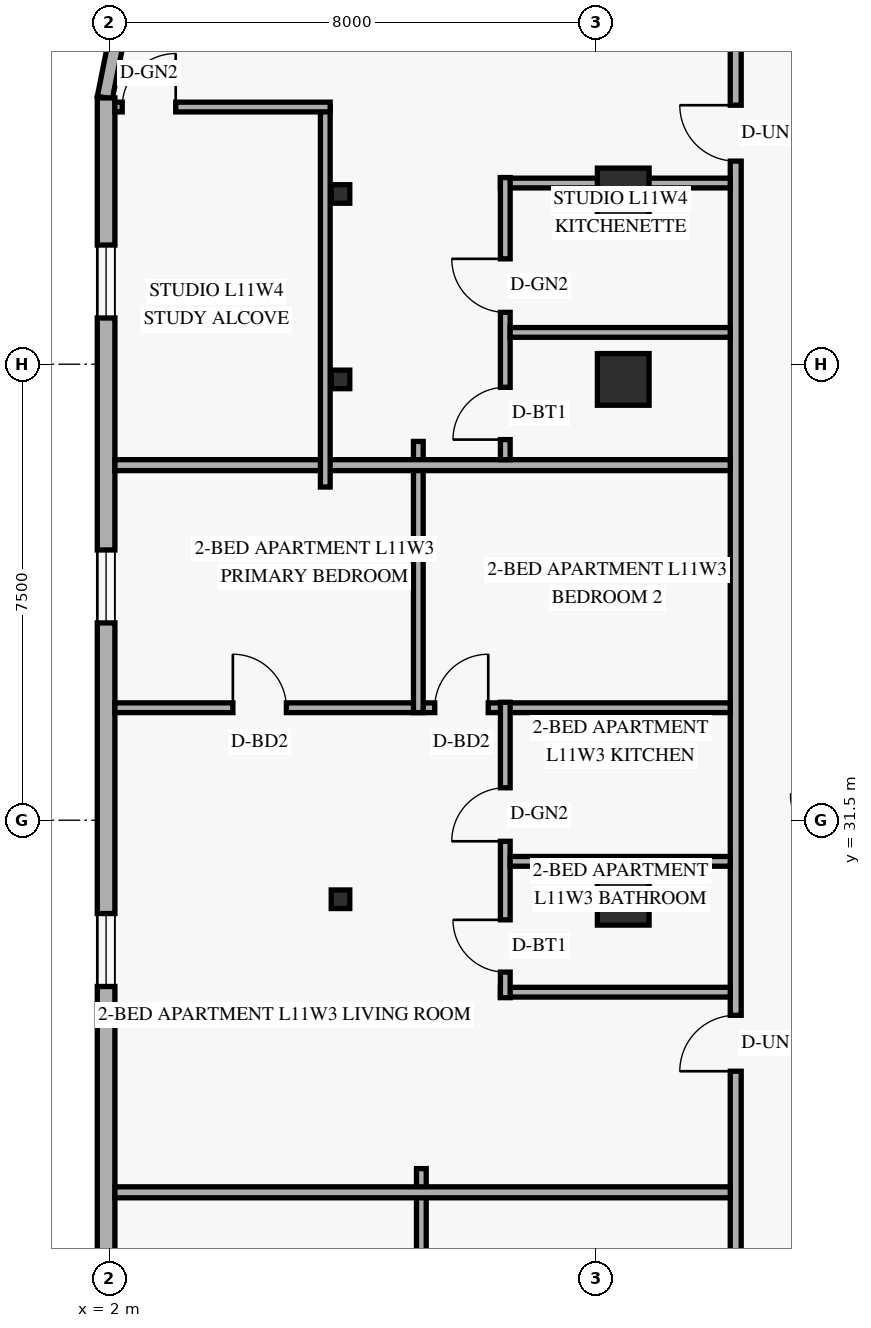
"""IFC4 building model, lengths in metres.
Left out: names, types, materials, properties, quantities, classifications, styles, units other than length and angle.
Written with IfcOpenShell. Run it as: python <this file> out.ifc"""

import sys

from ifc_helpers import new_model, si_unit, direction, frame, frame_2d, origin, origin_2d, place, context, subcontext, project, spatial, rectangle, hollow_rectangle, extrude, element, fill, save


model = new_model("IFC4")
c1 = context("Model", 3, precision=1e-05, world=origin(), true_north=direction((0.0, 1.0)))
c2 = subcontext(c1, "Body", "Model", "MODEL_VIEW")
j1 = project(units=[si_unit("LENGTHUNIT", "METRE"), si_unit("PLANEANGLEUNIT", "RADIAN")], contexts=[c1])
p1 = place(None, origin())
s1 = spatial("IfcSite", under=j1, at=p1, CompositionType="ELEMENT")
p2 = place(p1, origin())
s2 = spatial("IfcBuilding", under=s1, at=p2, CompositionType="ELEMENT")
p3 = place(p2, frame((0.0, 0.0, 45.6)))
s3 = spatial("IfcBuildingStorey", under=s2, at=p3, CompositionType="ELEMENT", Elevation=45.6)
for number, where, z_axis, x_axis in (
    (1, (5.8, 30.2, 0.0), (0.0, 0.0, 1.0), (1.0, 0.0, 0.0)),
    (2, (5.8, 38.75, 0.0), (0.0, 0.0, 1.0), (1.0, 0.0, 0.0)),
    (3, (5.8, 41.8, 0.0), (0.0, 0.0, 1.0), (1.0, 0.0, 0.0)),
):
    element("IfcColumn", number, at=place(p3, frame(where, z_axis=z_axis, x_axis=x_axis)), inside=s3, PredefinedType="COLUMN", context=c2, shape_type="SweptSolid", body=[
        extrude(hollow_rectangle(XDim=0.305, YDim=0.305, WallThickness=0.013, at=origin_2d()), origin(), (0.0, 0.0, 1.0), 3.6),
    ])
for number, where, z_axis, x_axis in (
    (4, (10.45, 30.2, 0.0), (0.0, 0.0, 1.0), (1.0, 0.0, 0.0)),
    (5, (10.45, 38.75, 0.0), (0.0, 0.0, 1.0), (1.0, 0.0, 0.0)),
    (6, (10.45, 41.8, 0.0), (0.0, 0.0, 1.0), (1.0, 0.0, 0.0)),
):
    element("IfcColumn", number, at=place(p3, frame(where, z_axis=z_axis, x_axis=x_axis)), inside=s3, PredefinedType="COLUMN", context=c2, shape_type="SweptSolid", body=[
        extrude(rectangle(XDim=0.85, YDim=0.85, at=origin_2d()), origin(), (0.0, 0.0, 1.0), 3.6),
    ])
p4 = place(p3, frame((2.195, 44.746, 0.0), z_axis=(0.0, 0.0, 1.0), x_axis=(-0.19496651342, -0.980809899341, 0.0)))
e7 = element("IfcWall", 7, at=p4, inside=s3, PredefinedType="SOLIDWALL", context=c2, shape_type="SweptSolid", body=[
    extrude(rectangle(XDim=1.389, YDim=0.25, at=frame_2d((0.694, 0.0))), origin(), (0.0, 0.0, 1.0), 3.36),
])
p5 = place(p3, frame((1.945, 43.38, 0.0), z_axis=(0.0, 0.0, 1.0), x_axis=(0.0, -1.0, 0.0)))
e8 = element("IfcWall", 8, at=p5, inside=s3, PredefinedType="SOLIDWALL", context=c2, shape_type="SweptSolid", body=[
    extrude(rectangle(XDim=38.76, YDim=0.29, at=frame_2d((19.38, 0.0))), origin(), (0.0, 0.0, 1.0), 3.36),
])
p6 = place(p5, frame((34.22, 0.0, 0.85)))
e9 = element("IfcOpeningElement", 9, at=p6, cuts=e8, PredefinedType="OPENING", context=c2, shape_type="SweptSolid", body=[
    extrude(rectangle(XDim=1.2, YDim=1.5, at=frame_2d((0.6, 0.75))), frame((0.0, 0.155, 0.0), z_axis=(0.0, -1.0, 0.0), x_axis=(1.0, 0.0, 0.0)), (0.0, 0.0, 1.0), 0.31),
])
p7 = place(p5, frame((29.035, 0.0, 0.85)))
e10 = element("IfcOpeningElement", 10, at=p7, cuts=e8, PredefinedType="OPENING", context=c2, shape_type="SweptSolid", body=[
    extrude(rectangle(XDim=1.2, YDim=1.5, at=frame_2d((0.6, 0.75))), frame((0.0, 0.155, 0.0), z_axis=(0.0, -1.0, 0.0), x_axis=(1.0, 0.0, 0.0)), (0.0, 0.0, 1.0), 0.31),
])
p8 = place(p5, frame((24.415, 0.0, 0.85)))
e11 = element("IfcOpeningElement", 11, at=p8, cuts=e8, PredefinedType="OPENING", context=c2, shape_type="SweptSolid", body=[
    extrude(rectangle(XDim=1.2, YDim=1.5, at=frame_2d((0.6, 0.75))), frame((0.0, 0.155, 0.0), z_axis=(0.0, -1.0, 0.0), x_axis=(1.0, 0.0, 0.0)), (0.0, 0.0, 1.0), 0.31),
])
p9 = place(p5, frame((19.22, 0.0, 0.85)))
e12 = element("IfcOpeningElement", 12, at=p9, cuts=e8, PredefinedType="OPENING", context=c2, shape_type="SweptSolid", body=[
    extrude(rectangle(XDim=1.2, YDim=1.5, at=frame_2d((0.6, 0.75))), frame((0.0, 0.155, 0.0), z_axis=(0.0, -1.0, 0.0), x_axis=(1.0, 0.0, 0.0)), (0.0, 0.0, 1.0), 0.31),
])
p10 = place(p5, frame((13.415, 0.0, 0.85)))
e13 = element("IfcOpeningElement", 13, at=p10, cuts=e8, PredefinedType="OPENING", context=c2, shape_type="SweptSolid", body=[
    extrude(rectangle(XDim=1.2, YDim=1.5, at=frame_2d((0.6, 0.75))), frame((0.0, 0.155, 0.0), z_axis=(0.0, -1.0, 0.0), x_axis=(1.0, 0.0, 0.0)), (0.0, 0.0, 1.0), 0.31),
])
p11 = place(p5, frame((7.435, 0.0, 0.85)))
e14 = element("IfcOpeningElement", 14, at=p11, cuts=e8, PredefinedType="OPENING", context=c2, shape_type="SweptSolid", body=[
    extrude(rectangle(XDim=1.2, YDim=1.5, at=frame_2d((0.6, 0.75))), frame((0.0, 0.155, 0.0), z_axis=(0.0, -1.0, 0.0), x_axis=(1.0, 0.0, 0.0)), (0.0, 0.0, 1.0), 0.31),
])
p12 = place(p5, frame((2.42, 0.0, 0.85)))
e15 = element("IfcOpeningElement", 15, at=p12, cuts=e8, PredefinedType="OPENING", context=c2, shape_type="SweptSolid", body=[
    extrude(rectangle(XDim=1.2, YDim=1.5, at=frame_2d((0.6, 0.75))), frame((0.0, 0.155, 0.0), z_axis=(0.0, -1.0, 0.0), x_axis=(1.0, 0.0, 0.0)), (0.0, 0.0, 1.0), 0.31),
])
p13 = place(p3, frame((12.3, 1.29, 0.0), z_axis=(0.0, 0.0, 1.0), x_axis=(0.0, 1.0, 0.0)))
e16 = element("IfcWall", 16, at=p13, inside=s3, PredefinedType="STANDARD", context=c2, shape_type="SweptSolid", body=[
    extrude(rectangle(XDim=45.42, YDim=0.18, at=frame_2d((22.71, 0.0))), origin(), (0.0, 0.0, 1.0), 2.649),
])
p14 = place(p13, frame((5.27, 0.0, 0.0)))
e17 = element("IfcOpeningElement", 17, at=p14, cuts=e16, PredefinedType="OPENING", context=c2, shape_type="SweptSolid", body=[
    extrude(rectangle(XDim=0.92, YDim=2.15, at=frame_2d((0.46, 1.075))), frame((0.0, 0.1, 0.0), z_axis=(0.0, -1.0, 0.0), x_axis=(1.0, 0.0, 0.0)), (0.0, 0.0, 1.0), 0.2),
])
p15 = place(p13, frame((14.5, 0.0, 0.0)))
e18 = element("IfcOpeningElement", 18, at=p15, cuts=e16, PredefinedType="OPENING", context=c2, shape_type="SweptSolid", body=[
    extrude(rectangle(XDim=0.92, YDim=2.15, at=frame_2d((0.46, 1.075))), frame((0.0, 0.1, 0.0), z_axis=(0.0, -1.0, 0.0), x_axis=(1.0, 0.0, 0.0)), (0.0, 0.0, 1.0), 0.2),
])
p16 = place(p13, frame((26.082, 0.0, 0.0)))
e19 = element("IfcOpeningElement", 19, at=p16, cuts=e16, PredefinedType="OPENING", context=c2, shape_type="SweptSolid", body=[
    extrude(rectangle(XDim=0.92, YDim=2.15, at=frame_2d((0.46, 1.075))), frame((0.0, 0.1, 0.0), z_axis=(0.0, -1.0, 0.0), x_axis=(1.0, 0.0, 0.0)), (0.0, 0.0, 1.0), 0.2),
])
p17 = place(p13, frame((41.05, 0.0, 0.0)))
e20 = element("IfcOpeningElement", 20, at=p17, cuts=e16, PredefinedType="OPENING", context=c2, shape_type="SweptSolid", body=[
    extrude(rectangle(XDim=0.92, YDim=2.15, at=frame_2d((0.46, 1.075))), frame((0.0, 0.1, 0.0), z_axis=(0.0, -1.0, 0.0), x_axis=(1.0, 0.0, 0.0)), (0.0, 0.0, 1.0), 0.2),
])
p18 = place(p3, frame((7.13, 21.66, 0.0), z_axis=(0.0, 0.0, 1.0), x_axis=(0.0, 1.0, 0.0)))
e21 = element("IfcWall", 21, at=p18, inside=s3, PredefinedType="PARTITIONING", context=c2, shape_type="SweptSolid", body=[
    extrude(rectangle(XDim=4.11, YDim=0.16, at=frame_2d((2.055, 0.0))), origin(), (0.0, 0.0, 1.0), 3.36),
])
p19 = place(p3, frame((2.09, 25.38, 0.0), z_axis=(0.0, 0.0, 1.0), x_axis=(1.0, 0.0, 0.0)))
e22 = element("IfcWall", 22, at=p19, inside=s3, PredefinedType="PARTITIONING", context=c2, shape_type="SweptSolid", body=[
    extrude(rectangle(XDim=10.12, YDim=0.18, at=frame_2d((5.06, 0.0))), origin(), (0.0, 0.0, 1.0), 2.649),
])
p20 = place(p3, frame((2.09, 33.35, 0.0), z_axis=(0.0, 0.0, 1.0), x_axis=(1.0, 0.0, 0.0)))
e23 = element("IfcWall", 23, at=p20, inside=s3, PredefinedType="PARTITIONING", context=c2, shape_type="SweptSolid", body=[
    extrude(rectangle(XDim=10.12, YDim=0.16, at=frame_2d((5.06, 0.0))), origin(), (0.0, 0.0, 1.0), 2.649),
])
p21 = place(p20, frame((1.94, 0.0, 0.0)))
e24 = element("IfcOpeningElement", 24, at=p21, cuts=e23, PredefinedType="OPENING", context=c2, shape_type="SweptSolid", body=[
    extrude(rectangle(XDim=0.88, YDim=2.14, at=frame_2d((0.44, 1.07))), frame((0.0, 0.09, 0.0), z_axis=(0.0, -1.0, 0.0), x_axis=(1.0, 0.0, 0.0)), (0.0, 0.0, 1.0), 0.18),
])
p22 = place(p20, frame((5.26, 0.0, 0.0)))
e25 = element("IfcOpeningElement", 25, at=p22, cuts=e23, PredefinedType="OPENING", context=c2, shape_type="SweptSolid", body=[
    extrude(rectangle(XDim=0.88, YDim=2.14, at=frame_2d((0.44, 1.07))), frame((0.0, 0.09, 0.0), z_axis=(0.0, -1.0, 0.0), x_axis=(1.0, 0.0, 0.0)), (0.0, 0.0, 1.0), 0.18),
])
p23 = place(p3, frame((8.43, 28.671, 0.0), z_axis=(0.0, 0.0, 1.0), x_axis=(1.0, 0.0, 0.0)))
e26 = element("IfcWall", 26, at=p23, inside=s3, PredefinedType="PLUMBINGWALL", context=c2, shape_type="SweptSolid", body=[
    extrude(rectangle(XDim=3.78, YDim=0.16, at=frame_2d((1.89, 0.0))), origin(), (0.0, 0.0, 1.0), 2.649),
])
p24 = place(p3, frame((8.51, 28.582, 0.0), z_axis=(0.0, 0.0, 1.0), x_axis=(0.0, 1.0, 0.0)))
e27 = element("IfcWall", 27, at=p24, inside=s3, PredefinedType="PLUMBINGWALL", context=c2, shape_type="SweptSolid", body=[
    extrude(rectangle(XDim=4.858, YDim=0.16, at=frame_2d((2.429, 0.0))), origin(), (0.0, 0.0, 1.0), 2.649),
])
p25 = place(p24, frame((0.42, 0.0, 0.0)))
e28 = element("IfcOpeningElement", 28, at=p25, cuts=e27, PredefinedType="OPENING", context=c2, shape_type="SweptSolid", body=[
    extrude(rectangle(XDim=0.86, YDim=2.12, at=frame_2d((0.43, 1.06))), frame((0.0, 0.09, 0.0), z_axis=(0.0, -1.0, 0.0), x_axis=(1.0, 0.0, 0.0)), (0.0, 0.0, 1.0), 0.18),
])
p26 = place(p24, frame((2.572, 0.0, 0.0)))
e29 = element("IfcOpeningElement", 29, at=p26, cuts=e27, PredefinedType="OPENING", context=c2, shape_type="SweptSolid", body=[
    extrude(rectangle(XDim=0.88, YDim=2.12, at=frame_2d((0.44, 1.06))), frame((0.0, 0.09, 0.0), z_axis=(0.0, -1.0, 0.0), x_axis=(1.0, 0.0, 0.0)), (0.0, 0.0, 1.0), 0.18),
])
p27 = place(p3, frame((8.59, 30.823, 0.0), z_axis=(0.0, 0.0, 1.0), x_axis=(1.0, 0.0, 0.0)))
e30 = element("IfcWall", 30, at=p27, inside=s3, PredefinedType="PLUMBINGWALL", context=c2, shape_type="SweptSolid", body=[
    extrude(rectangle(XDim=3.62, YDim=0.16, at=frame_2d((1.81, 0.0))), origin(), (0.0, 0.0, 1.0), 2.649),
])
p28 = place(p3, frame((7.08, 33.27, 0.0), z_axis=(0.0, 0.0, 1.0), x_axis=(0.0, 1.0, 0.0)))
e31 = element("IfcWall", 31, at=p28, inside=s3, PredefinedType="PARTITIONING", context=c2, shape_type="SweptSolid", body=[
    extrude(rectangle(XDim=4.46, YDim=0.16, at=frame_2d((2.23, 0.0))), origin(), (0.0, 0.0, 1.0), 2.932),
])
p29 = place(p3, frame((2.09, 37.34, 0.0), z_axis=(0.0, 0.0, 1.0), x_axis=(1.0, 0.0, 0.0)))
e32 = element("IfcWall", 32, at=p29, inside=s3, PredefinedType="PARTITIONING", context=c2, shape_type="SweptSolid", body=[
    extrude(rectangle(XDim=10.12, YDim=0.18, at=frame_2d((5.06, 0.0))), origin(), (0.0, 0.0, 1.0), 2.649),
])
p30 = place(p3, frame((8.43, 41.98, 0.0), z_axis=(0.0, 0.0, 1.0), x_axis=(1.0, 0.0, 0.0)))
e33 = element("IfcWall", 33, at=p30, inside=s3, PredefinedType="PLUMBINGWALL", context=c2, shape_type="SweptSolid", body=[
    extrude(rectangle(XDim=3.78, YDim=0.16, at=frame_2d((1.89, 0.0))), origin(), (0.0, 0.0, 1.0), 2.809),
])
p31 = place(p3, frame((8.51, 37.43, 0.0), z_axis=(0.0, 0.0, 1.0), x_axis=(0.0, 1.0, 0.0)))
e34 = element("IfcWall", 34, at=p31, inside=s3, PredefinedType="PLUMBINGWALL", context=c2, shape_type="SweptSolid", body=[
    extrude(rectangle(XDim=4.64, YDim=0.16, at=frame_2d((2.32, 0.0))), origin(), (0.0, 0.0, 1.0), 2.649),
])
p32 = place(p31, frame((0.33, 0.0, 0.0)))
e35 = element("IfcOpeningElement", 35, at=p32, cuts=e34, PredefinedType="OPENING", context=c2, shape_type="SweptSolid", body=[
    extrude(rectangle(XDim=0.86, YDim=2.12, at=frame_2d((0.43, 1.06))), frame((0.0, 0.09, 0.0), z_axis=(0.0, -1.0, 0.0), x_axis=(1.0, 0.0, 0.0)), (0.0, 0.0, 1.0), 0.18),
])
p33 = place(p31, frame((2.423, 0.0, 0.0)))
e36 = element("IfcOpeningElement", 36, at=p33, cuts=e34, PredefinedType="OPENING", context=c2, shape_type="SweptSolid", body=[
    extrude(rectangle(XDim=0.88, YDim=2.12, at=frame_2d((0.44, 1.06))), frame((0.0, 0.09, 0.0), z_axis=(0.0, -1.0, 0.0), x_axis=(1.0, 0.0, 0.0)), (0.0, 0.0, 1.0), 0.18),
])
p34 = place(p3, frame((8.59, 39.523, 0.0), z_axis=(0.0, 0.0, 1.0), x_axis=(1.0, 0.0, 0.0)))
e37 = element("IfcWall", 37, at=p34, inside=s3, PredefinedType="PLUMBINGWALL", context=c2, shape_type="SweptSolid", body=[
    extrude(rectangle(XDim=3.62, YDim=0.16, at=frame_2d((1.81, 0.0))), origin(), (0.0, 0.0, 1.0), 2.649),
])
p35 = place(p3, frame((5.55, 36.98, 0.0), z_axis=(0.0, 0.0, 1.0), x_axis=(0.0, 1.0, 0.0)))
e38 = element("IfcWall", 38, at=p35, inside=s3, PredefinedType="PARTITIONING", context=c2, shape_type="SweptSolid", body=[
    extrude(rectangle(XDim=6.25, YDim=0.16, at=frame_2d((3.125, 0.0))), origin(), (0.0, 0.0, 1.0), 3.36),
])
p36 = place(p3, frame((2.09, 43.23, 0.0), z_axis=(0.0, 0.0, 1.0), x_axis=(1.0, 0.0, 0.0)))
e39 = element("IfcWall", 39, at=p36, inside=s3, PredefinedType="PARTITIONING", context=c2, shape_type="SweptSolid", body=[
    extrude(rectangle(XDim=3.54, YDim=0.16, at=frame_2d((1.77, 0.0))), origin(), (0.0, 0.0, 1.0), 3.36),
])
p37 = place(p36, frame((0.12, 0.0, 0.0)))
e40 = element("IfcOpeningElement", 40, at=p37, cuts=e39, PredefinedType="OPENING", context=c2, shape_type="SweptSolid", body=[
    extrude(rectangle(XDim=0.88, YDim=2.12, at=frame_2d((0.44, 1.06))), frame((0.0, 0.09, 0.0), z_axis=(0.0, -1.0, 0.0), x_axis=(1.0, 0.0, 0.0)), (0.0, 0.0, 1.0), 0.18),
])
p38 = place(p10, origin())
e41 = element("IfcWindow", 41, at=p38, inside=s3, PartitioningType="SINGLE_PANEL", PredefinedType="WINDOW", context=c2, shape_type="SweptSolid", body=[
    extrude(rectangle(XDim=1.2, YDim=1.5, at=frame_2d((0.6, 0.75))), frame((0.0, 0.03, 0.0), z_axis=(0.0, -1.0, 0.0), x_axis=(1.0, 0.0, 0.0)), (0.0, 0.0, 1.0), 0.06),
])
fill(e13, e41)
p39 = place(p11, origin())
e42 = element("IfcWindow", 42, at=p39, inside=s3, PartitioningType="SINGLE_PANEL", PredefinedType="WINDOW", context=c2, shape_type="SweptSolid", body=[
    extrude(rectangle(XDim=1.2, YDim=1.5, at=frame_2d((0.6, 0.75))), frame((0.0, 0.03, 0.0), z_axis=(0.0, -1.0, 0.0), x_axis=(1.0, 0.0, 0.0)), (0.0, 0.0, 1.0), 0.06),
])
fill(e14, e42)
p40 = place(p12, origin())
e43 = element("IfcWindow", 43, at=p40, inside=s3, PartitioningType="SINGLE_PANEL", PredefinedType="WINDOW", context=c2, shape_type="SweptSolid", body=[
    extrude(rectangle(XDim=1.2, YDim=1.5, at=frame_2d((0.6, 0.75))), frame((0.0, 0.03, 0.0), z_axis=(0.0, -1.0, 0.0), x_axis=(1.0, 0.0, 0.0)), (0.0, 0.0, 1.0), 0.06),
])
fill(e15, e43)
p41 = place(p16, origin())
e44 = element("IfcDoor", 44, at=p41, inside=s3, OperationType="SINGLE_SWING_LEFT", PredefinedType="DOOR", context=c2, shape_type="SweptSolid", body=[
    extrude(rectangle(XDim=0.92, YDim=2.15, at=frame_2d((0.46, 1.075))), frame((0.0, 0.025, 0.0), z_axis=(0.0, -1.0, 0.0), x_axis=(1.0, 0.0, 0.0)), (0.0, 0.0, 1.0), 0.05),
])
fill(e19, e44)
p42 = place(p25, origin())
e45 = element("IfcDoor", 45, at=p42, inside=s3, OperationType="SINGLE_SWING_RIGHT", PredefinedType="DOOR", context=c2, shape_type="SweptSolid", body=[
    extrude(rectangle(XDim=0.86, YDim=2.12, at=frame_2d((0.43, 1.06))), frame((0.0, 0.025, 0.0), z_axis=(0.0, -1.0, 0.0), x_axis=(1.0, 0.0, 0.0)), (0.0, 0.0, 1.0), 0.05),
])
fill(e28, e45)
p43 = place(p26, origin())
e46 = element("IfcDoor", 46, at=p43, inside=s3, OperationType="SINGLE_SWING_LEFT", PredefinedType="DOOR", context=c2, shape_type="SweptSolid", body=[
    extrude(rectangle(XDim=0.88, YDim=2.12, at=frame_2d((0.44, 1.06))), frame((0.0, 0.025, 0.0), z_axis=(0.0, -1.0, 0.0), x_axis=(1.0, 0.0, 0.0)), (0.0, 0.0, 1.0), 0.05),
])
fill(e29, e46)
p44 = place(p21, origin())
e47 = element("IfcDoor", 47, at=p44, inside=s3, OperationType="SINGLE_SWING_LEFT", PredefinedType="DOOR", context=c2, shape_type="SweptSolid", body=[
    extrude(rectangle(XDim=0.88, YDim=2.14, at=frame_2d((0.44, 1.07))), frame((0.0, 0.025, 0.0), z_axis=(0.0, -1.0, 0.0), x_axis=(1.0, 0.0, 0.0)), (0.0, 0.0, 1.0), 0.05),
])
fill(e24, e47)
p45 = place(p22, origin())
e48 = element("IfcDoor", 48, at=p45, inside=s3, OperationType="SINGLE_SWING_RIGHT", PredefinedType="DOOR", context=c2, shape_type="SweptSolid", body=[
    extrude(rectangle(XDim=0.88, YDim=2.14, at=frame_2d((0.44, 1.07))), frame((0.0, 0.025, 0.0), z_axis=(0.0, -1.0, 0.0), x_axis=(1.0, 0.0, 0.0)), (0.0, 0.0, 1.0), 0.05),
])
fill(e25, e48)
p46 = place(p37, frame((0.88, 0.0, 0.0), z_axis=(0.0, 0.0, 1.0), x_axis=(-1.0, 0.0, 0.0)))
e49 = element("IfcDoor", 49, at=p46, inside=s3, OperationType="SINGLE_SWING_LEFT", PredefinedType="DOOR", context=c2, shape_type="SweptSolid", body=[
    extrude(rectangle(XDim=0.88, YDim=2.12, at=frame_2d((0.44, 1.06))), frame((0.0, 0.025, 0.0), z_axis=(0.0, -1.0, 0.0), x_axis=(1.0, 0.0, 0.0)), (0.0, 0.0, 1.0), 0.05),
])
fill(e40, e49)
p47 = place(p17, origin())
e50 = element("IfcDoor", 50, at=p47, inside=s3, OperationType="SINGLE_SWING_RIGHT", PredefinedType="DOOR", context=c2, shape_type="SweptSolid", body=[
    extrude(rectangle(XDim=0.92, YDim=2.15, at=frame_2d((0.46, 1.075))), frame((0.0, 0.025, 0.0), z_axis=(0.0, -1.0, 0.0), x_axis=(1.0, 0.0, 0.0)), (0.0, 0.0, 1.0), 0.05),
])
fill(e20, e50)
p48 = place(p32, origin())
e51 = element("IfcDoor", 51, at=p48, inside=s3, OperationType="SINGLE_SWING_LEFT", PredefinedType="DOOR", context=c2, shape_type="SweptSolid", body=[
    extrude(rectangle(XDim=0.86, YDim=2.12, at=frame_2d((0.43, 1.06))), frame((0.0, 0.025, 0.0), z_axis=(0.0, -1.0, 0.0), x_axis=(1.0, 0.0, 0.0)), (0.0, 0.0, 1.0), 0.05),
])
fill(e35, e51)
p49 = place(p33, origin())
e52 = element("IfcDoor", 52, at=p49, inside=s3, OperationType="SINGLE_SWING_RIGHT", PredefinedType="DOOR", context=c2, shape_type="SweptSolid", body=[
    extrude(rectangle(XDim=0.88, YDim=2.12, at=frame_2d((0.44, 1.06))), frame((0.0, 0.025, 0.0), z_axis=(0.0, -1.0, 0.0), x_axis=(1.0, 0.0, 0.0)), (0.0, 0.0, 1.0), 0.05),
])
fill(e36, e52)
save(model, sys.argv[1])
